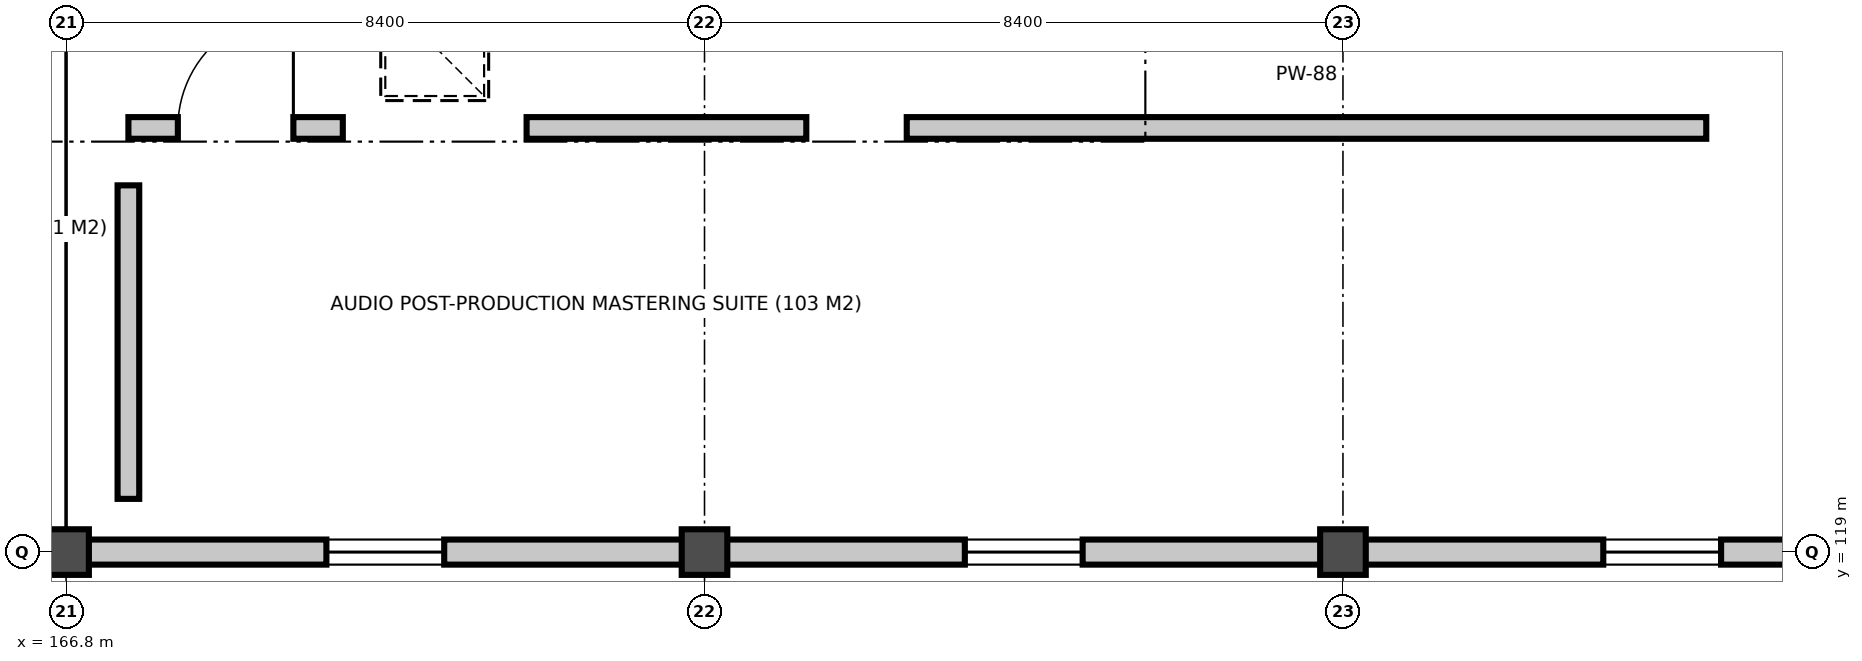
"""IFC4 building model, lengths in metres.
Left out: names, types, materials, properties, quantities, classifications, styles, units other than length and angle.
Written with IfcOpenShell. Run it as: python <this file> out.ifc"""

import sys

from ifc_helpers import new_model, si_unit, direction, frame, frame_2d, origin, origin_2d, place, context, subcontext, project, spatial, rectangle, extrude, element, fill, save


model = new_model("IFC4")
c1 = context("Model", 3, precision=1e-05, world=origin(), true_north=direction((0.0, 1.0)))
c2 = subcontext(c1, "Body", "Model", "MODEL_VIEW")
j1 = project(units=[si_unit("LENGTHUNIT", "METRE"), si_unit("PLANEANGLEUNIT", "RADIAN")], contexts=[c1])
p1 = place(None, origin())
s1 = spatial("IfcSite", under=j1, at=p1, CompositionType="ELEMENT")
p2 = place(p1, origin())
s2 = spatial("IfcBuilding", under=s1, at=p2, CompositionType="ELEMENT")
p3 = place(p2, frame((0.0, 0.0, 15.0)))
s3 = spatial("IfcBuildingStorey", under=s2, at=p3, CompositionType="ELEMENT", Elevation=15.0)
for number, where, z_axis, x_axis in (
    (1, (166.8, 119.0, 0.0), (0.0, 0.0, 1.0), (1.0, 0.0, 0.0)),
    (2, (175.2, 119.0, 0.0), (0.0, 0.0, 1.0), (1.0, 0.0, 0.0)),
    (3, (183.6, 119.0, 0.0), (0.0, 0.0, 1.0), (1.0, 0.0, 0.0)),
):
    element("IfcColumn", number, at=place(p3, frame(where, z_axis=z_axis, x_axis=x_axis)), inside=s3, PredefinedType="COLUMN", context=c2, shape_type="SweptSolid", body=[
        extrude(rectangle(XDim=0.6, YDim=0.6, at=origin_2d()), origin(), (0.0, 0.0, 1.0), 4.5),
    ])
p4 = place(p3, frame((174.92, 119.0, 0.0), z_axis=(0.0, 0.0, 1.0), x_axis=(-1.0, 0.0, 0.0)))
e4 = element("IfcWall", 4, at=p4, inside=s3, PredefinedType="SOLIDWALL", context=c2, shape_type="SweptSolid", body=[
    extrude(rectangle(XDim=7.84, YDim=0.33, at=frame_2d((3.92, 0.0))), origin(), (0.0, 0.0, 1.0), 3.456),
])
p5 = place(p4, frame((3.145, 0.0, 1.0)))
e5 = element("IfcOpeningElement", 5, at=p5, cuts=e4, PredefinedType="OPENING", context=c2, shape_type="SweptSolid", body=[
    extrude(rectangle(XDim=1.55, YDim=1.85, at=frame_2d((0.775, 0.925))), frame((0.0, 0.175, 0.0), z_axis=(0.0, -1.0, 0.0), x_axis=(1.0, 0.0, 0.0)), (0.0, 0.0, 1.0), 0.35),
])
p6 = place(p3, frame((183.32, 119.0, 0.0), z_axis=(0.0, 0.0, 1.0), x_axis=(-1.0, 0.0, 0.0)))
e6 = element("IfcWall", 6, at=p6, inside=s3, PredefinedType="SOLIDWALL", context=c2, shape_type="SweptSolid", body=[
    extrude(rectangle(XDim=7.84, YDim=0.33, at=frame_2d((3.92, 0.0))), origin(), (0.0, 0.0, 1.0), 3.314),
])
p7 = place(p6, frame((3.145, 0.0, 1.0)))
e7 = element("IfcOpeningElement", 7, at=p7, cuts=e6, PredefinedType="OPENING", context=c2, shape_type="SweptSolid", body=[
    extrude(rectangle(XDim=1.55, YDim=1.85, at=frame_2d((0.775, 0.925))), frame((0.0, 0.175, 0.0), z_axis=(0.0, -1.0, 0.0), x_axis=(1.0, 0.0, 0.0)), (0.0, 0.0, 1.0), 0.35),
])
p8 = place(p3, frame((191.72, 119.0, 0.0), z_axis=(0.0, 0.0, 1.0), x_axis=(-1.0, 0.0, 0.0)))
e8 = element("IfcWall", 8, at=p8, inside=s3, PredefinedType="SOLIDWALL", context=c2, shape_type="SweptSolid", body=[
    extrude(rectangle(XDim=7.84, YDim=0.33, at=frame_2d((3.92, 0.0))), origin(), (0.0, 0.0, 1.0), 3.371),
])
p9 = place(p8, frame((3.145, 0.0, 1.0)))
e9 = element("IfcOpeningElement", 9, at=p9, cuts=e8, PredefinedType="OPENING", context=c2, shape_type="SweptSolid", body=[
    extrude(rectangle(XDim=1.55, YDim=1.85, at=frame_2d((0.775, 0.925))), frame((0.0, 0.175, 0.0), z_axis=(0.0, -1.0, 0.0), x_axis=(1.0, 0.0, 0.0)), (0.0, 0.0, 1.0), 0.35),
])
p10 = place(p3, frame((167.62, 124.58, 0.0), z_axis=(0.0, 0.0, 1.0), x_axis=(1.0, 0.0, 0.0)))
e10 = element("IfcWall", 10, at=p10, inside=s3, PredefinedType="PARTITIONING", context=c2, shape_type="SweptSolid", body=[
    extrude(rectangle(XDim=2.821, YDim=0.285, at=frame_2d((1.41, 0.0))), origin(), (0.0, 0.0, 1.0), 3.13),
])
p11 = place(p10, frame((0.65, 0.0, 0.0)))
e11 = element("IfcOpeningElement", 11, at=p11, cuts=e10, PredefinedType="OPENING", context=c2, shape_type="SweptSolid", body=[
    extrude(rectangle(XDim=1.52, YDim=2.38, at=frame_2d((0.76, 1.19))), frame((0.0, 0.152, 0.0), z_axis=(0.0, -1.0, 0.0), x_axis=(1.0, 0.0, 0.0)), (0.0, 0.0, 1.0), 0.305),
])
p12 = place(p3, frame((172.859, 124.58, 0.0), z_axis=(0.0, 0.0, 1.0), x_axis=(1.0, 0.0, 0.0)))
e12 = element("IfcWall", 12, at=p12, inside=s3, PredefinedType="PARTITIONING", context=c2, shape_type="SweptSolid", body=[
    extrude(rectangle(XDim=3.68, YDim=0.285, at=frame_2d((1.84, 0.0))), origin(), (0.0, 0.0, 1.0), 3.13),
])
p13 = place(p3, frame((177.861, 124.58, 0.0), z_axis=(0.0, 0.0, 1.0), x_axis=(1.0, 0.0, 0.0)))
e13 = element("IfcWall", 13, at=p13, inside=s3, PredefinedType="PARTITIONING", context=c2, shape_type="SweptSolid", body=[
    extrude(rectangle(XDim=10.519, YDim=0.285, at=frame_2d((5.26, 0.0))), origin(), (0.0, 0.0, 1.0), 3.13),
])
p14 = place(p3, frame((167.62, 119.7, 0.0), z_axis=(0.0, 0.0, 1.0), x_axis=(0.0, 1.0, 0.0)))
e14 = element("IfcWall", 14, at=p14, inside=s3, PredefinedType="PARTITIONING", context=c2, shape_type="SweptSolid", body=[
    extrude(rectangle(XDim=4.125, YDim=0.285, at=frame_2d((2.062, 0.0))), origin(), (0.0, 0.0, 1.0), 3.13),
])
p15 = place(p5, origin())
e15 = element("IfcWindow", 15, at=p15, inside=s3, PartitioningType="SINGLE_PANEL", PredefinedType="WINDOW", context=c2, shape_type="SweptSolid", body=[
    extrude(rectangle(XDim=1.55, YDim=1.85, at=frame_2d((0.775, 0.925))), frame((0.0, 0.03, 0.0), z_axis=(0.0, -1.0, 0.0), x_axis=(1.0, 0.0, 0.0)), (0.0, 0.0, 1.0), 0.06),
])
fill(e5, e15)
p16 = place(p7, origin())
e16 = element("IfcWindow", 16, at=p16, inside=s3, PartitioningType="SINGLE_PANEL", PredefinedType="WINDOW", context=c2, shape_type="SweptSolid", body=[
    extrude(rectangle(XDim=1.55, YDim=1.85, at=frame_2d((0.775, 0.925))), frame((0.0, 0.03, 0.0), z_axis=(0.0, -1.0, 0.0), x_axis=(1.0, 0.0, 0.0)), (0.0, 0.0, 1.0), 0.06),
])
fill(e7, e16)
p17 = place(p9, origin())
e17 = element("IfcWindow", 17, at=p17, inside=s3, PartitioningType="SINGLE_PANEL", PredefinedType="WINDOW", context=c2, shape_type="SweptSolid", body=[
    extrude(rectangle(XDim=1.55, YDim=1.85, at=frame_2d((0.775, 0.925))), frame((0.0, 0.03, 0.0), z_axis=(0.0, -1.0, 0.0), x_axis=(1.0, 0.0, 0.0)), (0.0, 0.0, 1.0), 0.06),
])
fill(e9, e17)
p18 = place(p11, origin())
e18 = element("IfcDoor", 18, at=p18, inside=s3, OperationType="SINGLE_SWING_RIGHT", PredefinedType="DOOR", context=c2, shape_type="SweptSolid", body=[
    extrude(rectangle(XDim=1.52, YDim=2.38, at=frame_2d((0.76, 1.19))), frame((0.0, 0.025, 0.0), z_axis=(0.0, -1.0, 0.0), x_axis=(1.0, 0.0, 0.0)), (0.0, 0.0, 1.0), 0.05),
])
fill(e11, e18)
save(model, sys.argv[1])
